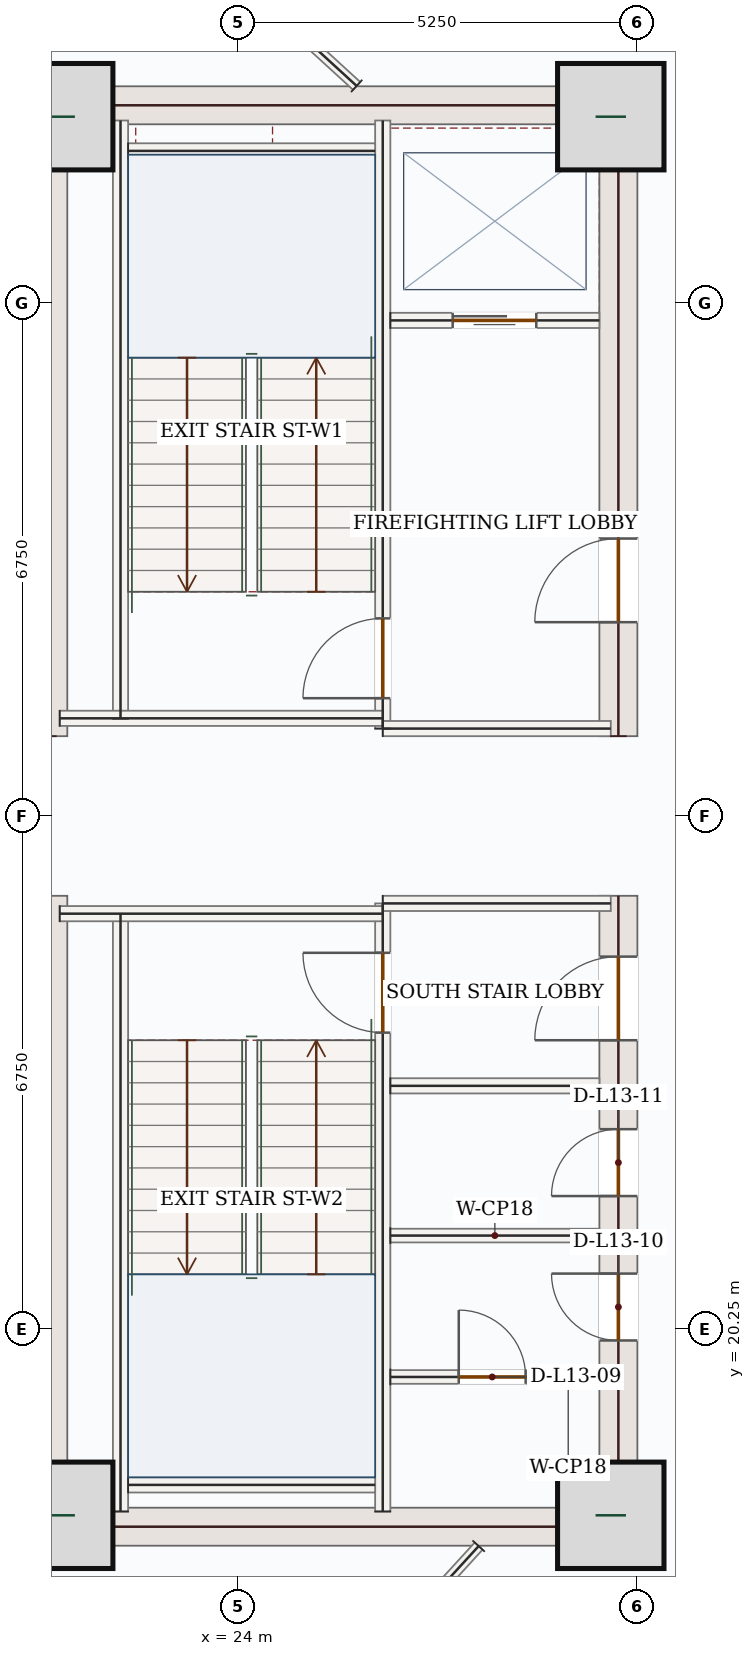
"""IFC4 building model, lengths in metres.
Left out: names, types, materials, properties, quantities, classifications, styles, units other than length and angle.
Written with IfcOpenShell. Run it as: python <this file> out.ifc"""

import sys

from ifc_helpers import new_model, si_unit, direction, frame, frame_2d, origin, origin_2d, place, context, subcontext, project, spatial, rectangle, extrude, source, transform, mapped, element, fill, save


model = new_model("IFC4")
c1 = context("Model", 3, precision=1e-05, world=origin(), true_north=direction((0.0, 1.0)))
c2 = subcontext(c1, "Body", "Model", "MODEL_VIEW")
j1 = project(units=[si_unit("LENGTHUNIT", "METRE"), si_unit("PLANEANGLEUNIT", "RADIAN")], contexts=[c1])
p1 = place(None, origin())
s1 = spatial("IfcSite", under=j1, at=p1, CompositionType="ELEMENT")
p2 = place(p1, origin())
s2 = spatial("IfcBuilding", under=s1, at=p2, CompositionType="ELEMENT")
p3 = place(p2, frame((0.0, 0.0, 62.7)))
s3 = spatial("IfcBuildingStorey", under=s2, at=p3, CompositionType="ELEMENT", Elevation=62.7)
m1 = source(origin(), c2, "Body", "SweptSolid", [
    extrude(rectangle(XDim=8.55, YDim=0.5, at=frame_2d((4.275, 0.0))), origin(), (0.0, 0.0, 1.0), 3.95),
])
for number, where, z_axis, x_axis in (
    (1, (21.5, 17.4, 0.0), (0.0, 0.0, 1.0), (0.0, 1.0, 0.0)),
    (2, (21.5, 28.05, 0.0), (0.0, 0.0, 1.0), (0.0, 1.0, 0.0)),
):
    element("IfcWall", number, at=place(p3, frame(where, z_axis=z_axis, x_axis=x_axis)), inside=s3, PredefinedType="SHEAR", context=c2, shape_type="MappedRepresentation", body=[
        mapped(m1, transform((0.0, 0.0, 0.0), x_axis=(1.0, 0.0, 0.0), y_axis=(0.0, 1.0, 0.0), z_axis=(0.0, 0.0, 1.0), scale=1.0)),
    ])
p4 = place(p3, frame((29.0, 17.4, 0.0), z_axis=(0.0, 0.0, 1.0), x_axis=(0.0, 1.0, 0.0)))
e3 = element("IfcWall", 3, at=p4, inside=s3, PredefinedType="SHEAR", context=c2, shape_type="SweptSolid", body=[
    extrude(rectangle(XDim=8.55, YDim=0.5, at=frame_2d((4.275, 0.0))), origin(), (0.0, 0.0, 1.0), 3.95),
])
p5 = place(p4, frame((6.65, 0.0, 0.0)))
e4 = element("IfcOpeningElement", 4, at=p5, cuts=e3, PredefinedType="OPENING", context=c2, shape_type="SweptSolid", body=[
    extrude(rectangle(XDim=1.1, YDim=2.2, at=frame_2d((0.55, 1.1))), frame((0.0, 0.26, 0.0), z_axis=(0.0, -1.0, 0.0), x_axis=(1.0, 0.0, 0.0)), (0.0, 0.0, 1.0), 0.52),
])
p6 = place(p4, frame((2.7, 0.0, 0.0)))
e5 = element("IfcOpeningElement", 5, at=p6, cuts=e3, PredefinedType="OPENING", context=c2, shape_type="SweptSolid", body=[
    extrude(rectangle(XDim=0.88, YDim=2.1, at=frame_2d((0.44, 1.05))), frame((0.0, 0.26, 0.0), z_axis=(0.0, -1.0, 0.0), x_axis=(1.0, 0.0, 0.0)), (0.0, 0.0, 1.0), 0.52),
])
p7 = place(p4, frame((4.6, 0.0, 0.0)))
e6 = element("IfcOpeningElement", 6, at=p7, cuts=e3, PredefinedType="OPENING", context=c2, shape_type="SweptSolid", body=[
    extrude(rectangle(XDim=0.88, YDim=2.1, at=frame_2d((0.44, 1.05))), frame((0.0, 0.26, 0.0), z_axis=(0.0, -1.0, 0.0), x_axis=(1.0, 0.0, 0.0)), (0.0, 0.0, 1.0), 0.52),
])
p8 = place(p3, frame((29.0, 28.05, 0.0), z_axis=(0.0, 0.0, 1.0), x_axis=(0.0, 1.0, 0.0)))
e7 = element("IfcWall", 7, at=p8, inside=s3, PredefinedType="SHEAR", context=c2, shape_type="SweptSolid", body=[
    extrude(rectangle(XDim=8.55, YDim=0.5, at=frame_2d((4.275, 0.0))), origin(), (0.0, 0.0, 1.0), 3.95),
])
p9 = place(p8, frame((1.5, 0.0, 0.0)))
e8 = element("IfcOpeningElement", 8, at=p9, cuts=e7, PredefinedType="OPENING", context=c2, shape_type="SweptSolid", body=[
    extrude(rectangle(XDim=1.1, YDim=2.2, at=frame_2d((0.55, 1.1))), frame((0.0, 0.26, 0.0), z_axis=(0.0, -1.0, 0.0), x_axis=(1.0, 0.0, 0.0)), (0.0, 0.0, 1.0), 0.52),
])
m2 = source(origin(), c2, "Body", "SweptSolid", [
    extrude(rectangle(XDim=7.0, YDim=0.5, at=frame_2d((3.5, 0.0))), origin(), (0.0, 0.0, 1.0), 3.95),
])
for number, where, z_axis, x_axis in (
    (9, (21.75, 17.65, 0.0), (0.0, 0.0, 1.0), (1.0, 0.0, 0.0)),
    (10, (21.75, 36.35, 0.0), (0.0, 0.0, 1.0), (1.0, 0.0, 0.0)),
):
    element("IfcWall", number, at=place(p3, frame(where, z_axis=z_axis, x_axis=x_axis)), inside=s3, PredefinedType="SHEAR", context=c2, shape_type="MappedRepresentation", body=[
        mapped(m2, transform((0.0, 0.0, 0.0), x_axis=(1.0, 0.0, 0.0), y_axis=(0.0, 1.0, 0.0), z_axis=(0.0, 0.0, 1.0), scale=1.0)),
    ])
m3 = source(origin(), c2, "Body", "SweptSolid", [
    extrude(rectangle(XDim=1.4, YDim=1.4, at=origin_2d()), origin(), (0.0, 0.0, 1.0), 4.2),
])
for number, where, z_axis, x_axis in (
    (11, (21.65, 17.8, 0.0), (0.0, 0.0, 1.0), (1.0, 0.0, 0.0)),
    (12, (28.9, 17.8, 0.0), (0.0, 0.0, 1.0), (1.0, 0.0, 0.0)),
    (13, (21.65, 36.2, 0.0), (0.0, 0.0, 1.0), (1.0, 0.0, 0.0)),
    (14, (28.9, 36.2, 0.0), (0.0, 0.0, 1.0), (1.0, 0.0, 0.0)),
):
    element("IfcColumn", number, at=place(p3, frame(where, z_axis=z_axis, x_axis=x_axis)), inside=s3, PredefinedType="COLUMN", context=c2, shape_type="MappedRepresentation", body=[
        mapped(m3, transform((0.0, 0.0, 0.0), x_axis=(1.0, 0.0, 0.0), y_axis=(0.0, 1.0, 0.0), z_axis=(0.0, 0.0, 1.0), scale=1.0)),
    ])
p10 = place(p3, frame((22.658, 14.74, 0.0), z_axis=(0.0, 0.0, 1.0), x_axis=(-0.707106781187, 0.707106781187, 0.0)))
e15 = element("IfcWall", 15, at=p10, inside=s3, PredefinedType="SOLIDWALL", context=c2, shape_type="SweptSolid", body=[
    extrude(rectangle(XDim=5.258, YDim=0.32, at=frame_2d((2.629, 0.0))), origin(), (0.0, 0.0, 1.0), 3.95),
])
p11 = place(p10, frame((1.429, 0.0, 0.85)))
e16 = element("IfcOpeningElement", 16, at=p11, cuts=e15, PredefinedType="OPENING", context=c2, shape_type="SweptSolid", body=[
    extrude(rectangle(XDim=2.4, YDim=1.8, at=frame_2d((1.2, 0.9))), frame((0.0, 0.17, 0.0), z_axis=(0.0, -1.0, 0.0), x_axis=(1.0, 0.0, 0.0)), (0.0, 0.0, 1.0), 0.34),
])
m4 = source(origin(), c2, "Body", "SweptSolid", [
    extrude(rectangle(XDim=5.258, YDim=0.32, at=frame_2d((2.629, 0.0))), origin(), (0.0, 0.0, 1.0), 3.95),
])
p12 = place(p3, frame((18.94, 35.542, 0.0), z_axis=(0.0, 0.0, 1.0), x_axis=(0.707106781187, 0.707106781187, 0.0)))
e17 = element("IfcWall", 17, at=p12, inside=s3, PredefinedType="SOLIDWALL", context=c2, shape_type="MappedRepresentation", body=[
    mapped(m4, transform((0.0, 0.0, 0.0), x_axis=(1.0, 0.0, 0.0), y_axis=(0.0, 1.0, 0.0), z_axis=(0.0, 0.0, 1.0), scale=1.0)),
])
m5 = source(origin(), c2, "Body", "SweptSolid", [
    extrude(rectangle(XDim=7.87, YDim=0.2, at=frame_2d((3.935, 0.0))), origin(), (0.0, 0.0, 1.0), 3.95),
])
for number, where, z_axis, x_axis in (
    (18, (22.45, 17.85, 0.0), (0.0, 0.0, 1.0), (0.0, 1.0, 0.0)),
    (19, (22.45, 28.28, 0.0), (0.0, 0.0, 1.0), (0.0, 1.0, 0.0)),
):
    element("IfcWall", number, at=place(p3, frame(where, z_axis=z_axis, x_axis=x_axis)), inside=s3, PredefinedType="SOLIDWALL", context=c2, shape_type="MappedRepresentation", body=[
        mapped(m5, transform((0.0, 0.0, 0.0), x_axis=(1.0, 0.0, 0.0), y_axis=(0.0, 1.0, 0.0), z_axis=(0.0, 0.0, 1.0), scale=1.0)),
    ])
p13 = place(p3, frame((25.9, 17.85, 0.0), z_axis=(0.0, 0.0, 1.0), x_axis=(0.0, 1.0, 0.0)))
e20 = element("IfcWall", 20, at=p13, inside=s3, PredefinedType="SOLIDWALL", context=c2, shape_type="SweptSolid", body=[
    extrude(rectangle(XDim=8.0, YDim=0.2, at=frame_2d((4.0, 0.0))), origin(), (0.0, 0.0, 1.0), 3.95),
])
p14 = place(p13, frame((6.3, 0.0, 0.0)))
e21 = element("IfcOpeningElement", 21, at=p14, cuts=e20, PredefinedType="OPENING", context=c2, shape_type="SweptSolid", body=[
    extrude(rectangle(XDim=1.05, YDim=2.15, at=frame_2d((0.525, 1.075))), frame((0.0, 0.11, 0.0), z_axis=(0.0, -1.0, 0.0), x_axis=(1.0, 0.0, 0.0)), (0.0, 0.0, 1.0), 0.22),
])
p15 = place(p3, frame((25.9, 28.15, 0.0), z_axis=(0.0, 0.0, 1.0), x_axis=(0.0, 1.0, 0.0)))
e22 = element("IfcWall", 22, at=p15, inside=s3, PredefinedType="SOLIDWALL", context=c2, shape_type="SweptSolid", body=[
    extrude(rectangle(XDim=8.0, YDim=0.2, at=frame_2d((4.0, 0.0))), origin(), (0.0, 0.0, 1.0), 3.95),
])
p16 = place(p15, frame((0.4, 0.0, 0.0)))
e23 = element("IfcOpeningElement", 23, at=p16, cuts=e22, PredefinedType="OPENING", context=c2, shape_type="SweptSolid", body=[
    extrude(rectangle(XDim=1.05, YDim=2.15, at=frame_2d((0.525, 1.075))), frame((0.0, 0.11, 0.0), z_axis=(0.0, -1.0, 0.0), x_axis=(1.0, 0.0, 0.0)), (0.0, 0.0, 1.0), 0.22),
])
m6 = source(origin(), c2, "Body", "SweptSolid", [
    extrude(rectangle(XDim=4.25, YDim=0.2, at=frame_2d((2.125, 0.0))), origin(), (0.0, 0.0, 1.0), 3.95),
])
p17 = place(p3, frame((21.65, 25.715, 0.0), z_axis=(0.0, 0.0, 1.0), x_axis=(1.0, 0.0, 0.0)))
e24 = element("IfcWall", 24, at=p17, inside=s3, PredefinedType="SOLIDWALL", context=c2, shape_type="MappedRepresentation", body=[
    mapped(m6, transform((0.0, 0.0, 0.0), x_axis=(1.0, 0.0, 0.0), y_axis=(0.0, 1.0, 0.0), z_axis=(0.0, 0.0, 1.0), scale=1.0)),
])
m7 = source(origin(), c2, "Body", "SweptSolid", [
    extrude(rectangle(XDim=3.0, YDim=0.2, at=frame_2d((1.5, 0.0))), origin(), (0.0, 0.0, 1.0), 3.95),
])
p18 = place(p3, frame((25.9, 25.85, 0.0), z_axis=(0.0, 0.0, 1.0), x_axis=(1.0, 0.0, 0.0)))
e25 = element("IfcWall", 25, at=p18, inside=s3, PredefinedType="SOLIDWALL", context=c2, shape_type="MappedRepresentation", body=[
    mapped(m7, transform((0.0, 0.0, 0.0), x_axis=(1.0, 0.0, 0.0), y_axis=(0.0, 1.0, 0.0), z_axis=(0.0, 0.0, 1.0), scale=1.0)),
])
p19 = place(p3, frame((21.65, 28.285, 0.0), z_axis=(0.0, 0.0, 1.0), x_axis=(1.0, 0.0, 0.0)))
e26 = element("IfcWall", 26, at=p19, inside=s3, PredefinedType="SOLIDWALL", context=c2, shape_type="MappedRepresentation", body=[
    mapped(m6, transform((0.0, 0.0, 0.0), x_axis=(1.0, 0.0, 0.0), y_axis=(0.0, 1.0, 0.0), z_axis=(0.0, 0.0, 1.0), scale=1.0)),
])
p20 = place(p3, frame((25.9, 28.15, 0.0), z_axis=(0.0, 0.0, 1.0), x_axis=(1.0, 0.0, 0.0)))
e27 = element("IfcWall", 27, at=p20, inside=s3, PredefinedType="SOLIDWALL", context=c2, shape_type="MappedRepresentation", body=[
    mapped(m7, transform((0.0, 0.0, 0.0), x_axis=(1.0, 0.0, 0.0), y_axis=(0.0, 1.0, 0.0), z_axis=(0.0, 0.0, 1.0), scale=1.0)),
])
m8 = source(origin(), c2, "Body", "SweptSolid", [
    extrude(rectangle(XDim=3.25, YDim=0.2, at=frame_2d((1.625, 0.0))), origin(), (0.0, 0.0, 1.0), 3.95),
])
for number, where, z_axis, x_axis in (
    (28, (22.55, 35.75, 0.0), (0.0, 0.0, 1.0), (1.0, 0.0, 0.0)),
    (29, (22.55, 18.2, 0.0), (0.0, 0.0, 1.0), (1.0, 0.0, 0.0)),
):
    element("IfcWall", number, at=place(p3, frame(where, z_axis=z_axis, x_axis=x_axis)), inside=s3, PredefinedType="SOLIDWALL", context=c2, shape_type="MappedRepresentation", body=[
        mapped(m8, transform((0.0, 0.0, 0.0), x_axis=(1.0, 0.0, 0.0), y_axis=(0.0, 1.0, 0.0), z_axis=(0.0, 0.0, 1.0), scale=1.0)),
    ])
p21 = place(p3, frame((26.0, 33.52, 0.0), z_axis=(0.0, 0.0, 1.0), x_axis=(1.0, 0.0, 0.0)))
e30 = element("IfcWall", 30, at=p21, inside=s3, PredefinedType="SOLIDWALL", context=c2, shape_type="SweptSolid", body=[
    extrude(rectangle(XDim=2.75, YDim=0.2, at=frame_2d((1.375, 0.0))), origin(), (0.0, 0.0, 1.0), 3.95),
])
p22 = place(p21, frame((0.82, 0.0, 0.0)))
e31 = element("IfcOpeningElement", 31, at=p22, cuts=e30, PredefinedType="OPENING", context=c2, shape_type="SweptSolid", body=[
    extrude(rectangle(XDim=1.1, YDim=2.15, at=frame_2d((0.55, 1.075))), frame((0.0, 0.11, 0.0), z_axis=(0.0, -1.0, 0.0), x_axis=(1.0, 0.0, 0.0)), (0.0, 0.0, 1.0), 0.22),
])
m9 = source(origin(), c2, "Body", "SweptSolid", [
    extrude(rectangle(XDim=2.75, YDim=0.2, at=frame_2d((1.375, 0.0))), origin(), (0.0, 0.0, 1.0), 3.95),
])
p23 = place(p3, frame((26.0, 23.45, 0.0), z_axis=(0.0, 0.0, 1.0), x_axis=(1.0, 0.0, 0.0)))
e32 = element("IfcWall", 32, at=p23, inside=s3, PredefinedType="SOLIDWALL", context=c2, shape_type="MappedRepresentation", body=[
    mapped(m9, transform((0.0, 0.0, 0.0), x_axis=(1.0, 0.0, 0.0), y_axis=(0.0, 1.0, 0.0), z_axis=(0.0, 0.0, 1.0), scale=1.0)),
])
p24 = place(p3, frame((26.0, 19.62, 0.0), z_axis=(0.0, 0.0, 1.0), x_axis=(1.0, 0.0, 0.0)))
e33 = element("IfcWall", 33, at=p24, inside=s3, PredefinedType="PARTITIONING", context=c2, shape_type="SweptSolid", body=[
    extrude(rectangle(XDim=2.75, YDim=0.18, at=frame_2d((1.375, 0.0))), origin(), (0.0, 0.0, 1.0), 3.95),
])
p25 = place(p24, frame((0.9, 0.0, 0.0)))
e34 = element("IfcOpeningElement", 34, at=p25, cuts=e33, PredefinedType="OPENING", context=c2, shape_type="SweptSolid", body=[
    extrude(rectangle(XDim=0.88, YDim=2.1, at=frame_2d((0.44, 1.05))), frame((0.0, 0.1, 0.0), z_axis=(0.0, -1.0, 0.0), x_axis=(1.0, 0.0, 0.0)), (0.0, 0.0, 1.0), 0.2),
])
m10 = source(origin(), c2, "Body", "SweptSolid", [
    extrude(rectangle(XDim=2.75, YDim=0.18, at=frame_2d((1.375, 0.0))), origin(), (0.0, 0.0, 1.0), 3.95),
])
p26 = place(p3, frame((26.0, 21.48, 0.0), z_axis=(0.0, 0.0, 1.0), x_axis=(1.0, 0.0, 0.0)))
e35 = element("IfcWall", 35, at=p26, inside=s3, PredefinedType="PARTITIONING", context=c2, shape_type="MappedRepresentation", body=[
    mapped(m10, transform((0.0, 0.0, 0.0), x_axis=(1.0, 0.0, 0.0), y_axis=(0.0, 1.0, 0.0), z_axis=(0.0, 0.0, 1.0), scale=1.0)),
])
m11 = source(origin(), c2, "Body", "SweptSolid", [
    extrude(rectangle(XDim=3.689, YDim=0.14, at=frame_2d((1.844, 0.0))), origin(), (0.0, 0.0, 1.0), 3.95),
])
p27 = place(p3, frame((25.557, 36.605, 0.0), z_axis=(0.0, 0.0, 1.0), x_axis=(-0.737843279395, 0.674972069831, 0.0)))
e36 = element("IfcWall", 36, at=p27, inside=s3, PredefinedType="PARTITIONING", context=c2, shape_type="MappedRepresentation", body=[
    mapped(m11, transform((0.0, 0.0, 0.0), x_axis=(1.0, 0.0, 0.0), y_axis=(0.0, 1.0, 0.0), z_axis=(0.0, 0.0, 1.0), scale=1.0)),
])
m12 = source(origin(), c2, "Body", "SweptSolid", [
    extrude(rectangle(XDim=3.375, YDim=0.14, at=frame_2d((1.688, 0.0))), origin(), (0.0, 0.0, 1.0), 3.95),
])
p28 = place(p3, frame((27.162, 17.395, 0.0), z_axis=(0.0, 0.0, 1.0), x_axis=(-0.674974079893, -0.737841440604, 0.0)))
e37 = element("IfcWall", 37, at=p28, inside=s3, PredefinedType="PARTITIONING", context=c2, shape_type="MappedRepresentation", body=[
    mapped(m12, transform((0.0, 0.0, 0.0), x_axis=(1.0, 0.0, 0.0), y_axis=(0.0, 1.0, 0.0), z_axis=(0.0, 0.0, 1.0), scale=1.0)),
])
m13 = source(origin(), c2, "Body", "SweptSolid", [
    extrude(rectangle(XDim=2.4, YDim=1.8, at=frame_2d((1.2, 0.9))), frame((0.0, 0.03, 0.0), z_axis=(0.0, -1.0, 0.0), x_axis=(1.0, 0.0, 0.0)), (0.0, 0.0, 1.0), 0.06),
])
p29 = place(p11, origin())
e38 = element("IfcWindow", 38, at=p29, inside=s3, PartitioningType="DOUBLE_PANEL_VERTICAL", PredefinedType="WINDOW", context=c2, shape_type="MappedRepresentation", body=[
    mapped(m13, transform((0.0, 0.0, 0.0), x_axis=(1.0, 0.0, 0.0), y_axis=(0.0, 1.0, 0.0), z_axis=(0.0, 0.0, 1.0), scale=1.0)),
])
fill(e16, e38)
m14 = source(origin(), c2, "Body", "SweptSolid", [
    extrude(rectangle(XDim=1.05, YDim=2.15, at=frame_2d((0.525, 1.075))), frame((0.0, 0.025, 0.0), z_axis=(0.0, -1.0, 0.0), x_axis=(1.0, 0.0, 0.0)), (0.0, 0.0, 1.0), 0.05),
])
p30 = place(p16, origin())
e39 = element("IfcDoor", 39, at=p30, inside=s3, OperationType="SINGLE_SWING_LEFT", PredefinedType="DOOR", context=c2, shape_type="MappedRepresentation", body=[
    mapped(m14, transform((0.0, 0.0, 0.0), x_axis=(1.0, 0.0, 0.0), y_axis=(0.0, 1.0, 0.0), z_axis=(0.0, 0.0, 1.0), scale=1.0)),
])
fill(e23, e39)
p31 = place(p14, origin())
e40 = element("IfcDoor", 40, at=p31, inside=s3, OperationType="SINGLE_SWING_RIGHT", PredefinedType="DOOR", context=c2, shape_type="MappedRepresentation", body=[
    mapped(m14, transform((0.0, 0.0, 0.0), x_axis=(1.0, 0.0, 0.0), y_axis=(0.0, 1.0, 0.0), z_axis=(0.0, 0.0, 1.0), scale=1.0)),
])
fill(e21, e40)
m15 = source(origin(), c2, "Body", "SweptSolid", [
    extrude(rectangle(XDim=1.1, YDim=2.15, at=frame_2d((0.55, 1.075))), frame((0.0, 0.025, 0.0), z_axis=(0.0, -1.0, 0.0), x_axis=(1.0, 0.0, 0.0)), (0.0, 0.0, 1.0), 0.05),
])
p32 = place(p22, origin())
e41 = element("IfcDoor", 41, at=p32, inside=s3, OperationType="DOUBLE_DOOR_SLIDING", PredefinedType="DOOR", context=c2, shape_type="MappedRepresentation", body=[
    mapped(m15, transform((0.0, 0.0, 0.0), x_axis=(1.0, 0.0, 0.0), y_axis=(0.0, 1.0, 0.0), z_axis=(0.0, 0.0, 1.0), scale=1.0)),
])
fill(e31, e41)
m16 = source(origin(), c2, "Body", "SweptSolid", [
    extrude(rectangle(XDim=1.1, YDim=2.2, at=frame_2d((0.55, 1.1))), frame((0.0, 0.025, 0.0), z_axis=(0.0, -1.0, 0.0), x_axis=(1.0, 0.0, 0.0)), (0.0, 0.0, 1.0), 0.05),
])
p33 = place(p9, origin())
e42 = element("IfcDoor", 42, at=p33, inside=s3, OperationType="SINGLE_SWING_LEFT", PredefinedType="DOOR", context=c2, shape_type="MappedRepresentation", body=[
    mapped(m16, transform((0.0, 0.0, 0.0), x_axis=(1.0, 0.0, 0.0), y_axis=(0.0, 1.0, 0.0), z_axis=(0.0, 0.0, 1.0), scale=1.0)),
])
fill(e8, e42)
p34 = place(p5, origin())
e43 = element("IfcDoor", 43, at=p34, inside=s3, OperationType="SINGLE_SWING_LEFT", PredefinedType="DOOR", context=c2, shape_type="MappedRepresentation", body=[
    mapped(m16, transform((0.0, 0.0, 0.0), x_axis=(1.0, 0.0, 0.0), y_axis=(0.0, 1.0, 0.0), z_axis=(0.0, 0.0, 1.0), scale=1.0)),
])
fill(e4, e43)
m17 = source(origin(), c2, "Body", "SweptSolid", [
    extrude(rectangle(XDim=0.88, YDim=2.1, at=frame_2d((0.44, 1.05))), frame((0.0, 0.025, 0.0), z_axis=(0.0, -1.0, 0.0), x_axis=(1.0, 0.0, 0.0)), (0.0, 0.0, 1.0), 0.05),
])
p35 = place(p25, origin())
e44 = element("IfcDoor", 44, at=p35, inside=s3, OperationType="SINGLE_SWING_LEFT", PredefinedType="DOOR", context=c2, shape_type="MappedRepresentation", body=[
    mapped(m17, transform((0.0, 0.0, 0.0), x_axis=(1.0, 0.0, 0.0), y_axis=(0.0, 1.0, 0.0), z_axis=(0.0, 0.0, 1.0), scale=1.0)),
])
fill(e34, e44)
p36 = place(p6, origin())
e45 = element("IfcDoor", 45, at=p36, inside=s3, OperationType="SINGLE_SWING_RIGHT", PredefinedType="DOOR", context=c2, shape_type="MappedRepresentation", body=[
    mapped(m17, transform((0.0, 0.0, 0.0), x_axis=(1.0, 0.0, 0.0), y_axis=(0.0, 1.0, 0.0), z_axis=(0.0, 0.0, 1.0), scale=1.0)),
])
fill(e5, e45)
p37 = place(p7, origin())
e46 = element("IfcDoor", 46, at=p37, inside=s3, OperationType="SINGLE_SWING_LEFT", PredefinedType="DOOR", context=c2, shape_type="MappedRepresentation", body=[
    mapped(m17, transform((0.0, 0.0, 0.0), x_axis=(1.0, 0.0, 0.0), y_axis=(0.0, 1.0, 0.0), z_axis=(0.0, 0.0, 1.0), scale=1.0)),
])
fill(e6, e46)
save(model, sys.argv[1])
